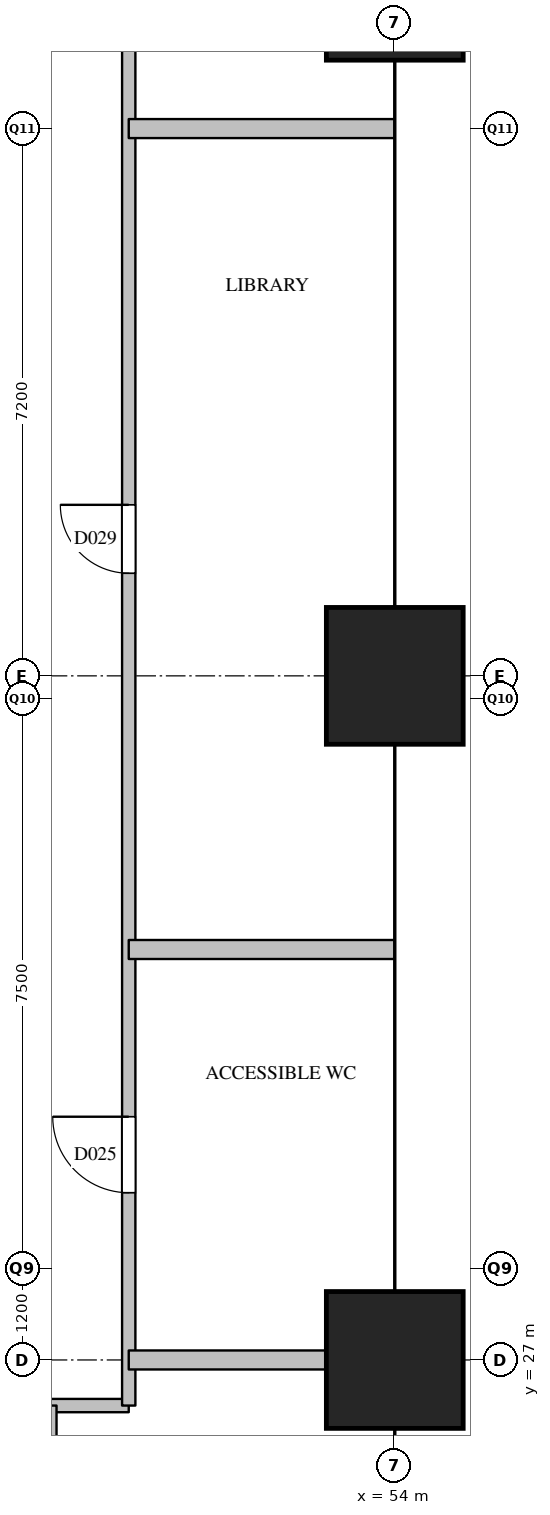
"""IFC4 building model, lengths in metres.
Left out: names, types, materials, properties, quantities, classifications, styles, units other than length and angle.
Written with IfcOpenShell. Run it as: python <this file> out.ifc"""

import sys

from ifc_helpers import new_model, si_unit, direction, frame, frame_2d, origin, origin_2d, place, context, subcontext, project, spatial, rectangle, extrude, element, fill, save


model = new_model("IFC4")
c1 = context("Model", 3, precision=1e-05, world=origin(), true_north=direction((0.0, 1.0)))
c2 = subcontext(c1, "Body", "Model", "MODEL_VIEW")
j1 = project(units=[si_unit("LENGTHUNIT", "METRE"), si_unit("PLANEANGLEUNIT", "RADIAN")], contexts=[c1])
p1 = place(None, origin())
s1 = spatial("IfcSite", under=j1, at=p1, CompositionType="ELEMENT")
p2 = place(p1, origin())
s2 = spatial("IfcBuilding", under=s1, at=p2, CompositionType="ELEMENT")
p3 = place(p2, frame((0.0, 0.0, 53.8)))
s3 = spatial("IfcBuildingStorey", under=s2, at=p3, CompositionType="ELEMENT", Elevation=53.8)
for number, where, z_axis, x_axis in (
    (1, (54.0, 27.0, 0.0), (0.0, 0.0, 1.0), (1.0, 0.0, 0.0)),
    (2, (54.0, 36.0, 0.0), (0.0, 0.0, 1.0), (1.0, 0.0, 0.0)),
    (3, (54.0, 45.0, 0.0), (0.0, 0.0, 1.0), (1.0, 0.0, 0.0)),
):
    element("IfcColumn", number, at=place(p3, frame(where, z_axis=z_axis, x_axis=x_axis)), inside=s3, PredefinedType="COLUMN", context=c2, shape_type="SweptSolid", body=[
        extrude(rectangle(XDim=1.8, YDim=1.8, at=origin_2d()), origin(), (0.0, 0.0, 1.0), 3.8),
    ])
p4 = place(p3, frame((47.32, 26.4, 0.0), z_axis=(0.0, 0.0, 1.0), x_axis=(1.0, 0.0, 0.0)))
e4 = element("IfcWall", 4, at=p4, inside=s3, PredefinedType="PARTITIONING", context=c2, shape_type="SweptSolid", body=[
    extrude(rectangle(XDim=3.18, YDim=0.175, at=frame_2d((1.59, 0.0))), origin(), (0.0, 0.0, 1.0), 3.5),
])
p5 = place(p3, frame((50.5, 26.4, 0.0), z_axis=(0.0, 0.0, 1.0), x_axis=(0.0, 1.0, 0.0)))
e5 = element("IfcWall", 5, at=p5, inside=s3, PredefinedType="PARTITIONING", context=c2, shape_type="SweptSolid", body=[
    extrude(rectangle(XDim=25.7, YDim=0.175, at=frame_2d((12.85, 0.0))), origin(), (0.0, 0.0, 1.0), 2.5),
])
p6 = place(p5, frame((2.8, 0.0, 0.0)))
e6 = element("IfcOpeningElement", 6, at=p6, cuts=e5, PredefinedType="OPENING", context=c2, shape_type="SweptSolid", body=[
    extrude(rectangle(XDim=1.0, YDim=2.1, at=frame_2d((0.5, 1.05))), frame((0.0, 0.097, 0.0), z_axis=(0.0, -1.0, 0.0), x_axis=(1.0, 0.0, 0.0)), (0.0, 0.0, 1.0), 0.195),
])
p7 = place(p5, frame((10.95, 0.0, 0.0)))
e7 = element("IfcOpeningElement", 7, at=p7, cuts=e5, PredefinedType="OPENING", context=c2, shape_type="SweptSolid", body=[
    extrude(rectangle(XDim=0.9, YDim=2.1, at=frame_2d((0.45, 1.05))), frame((0.0, 0.097, 0.0), z_axis=(0.0, -1.0, 0.0), x_axis=(1.0, 0.0, 0.0)), (0.0, 0.0, 1.0), 0.195),
])
p8 = place(p5, frame((20.8, 0.0, 0.0)))
e8 = element("IfcOpeningElement", 8, at=p8, cuts=e5, PredefinedType="OPENING", context=c2, shape_type="SweptSolid", body=[
    extrude(rectangle(XDim=0.9, YDim=2.1, at=frame_2d((0.45, 1.05))), frame((0.0, 0.097, 0.0), z_axis=(0.0, -1.0, 0.0), x_axis=(1.0, 0.0, 0.0)), (0.0, 0.0, 1.0), 0.195),
])
for number, where, z_axis, x_axis in (
    (9, (50.5, 27.0, 0.0), (0.0, 0.0, 1.0), (1.0, 0.0, 0.0)),
    (10, (50.5, 32.4, 0.0), (0.0, 0.0, 1.0), (1.0, 0.0, 0.0)),
    (11, (50.5, 43.2, 0.0), (0.0, 0.0, 1.0), (1.0, 0.0, 0.0)),
):
    element("IfcWall", number, at=place(p3, frame(where, z_axis=z_axis, x_axis=x_axis)), inside=s3, PredefinedType="PARTITIONING", context=c2, shape_type="SweptSolid", body=[
        extrude(rectangle(XDim=3.5, YDim=0.25, at=frame_2d((1.75, 0.0))), origin(), (0.0, 0.0, 1.0), 2.5),
    ])
p9 = place(p3, frame((49.5, 24.6, 0.0), z_axis=(0.0, 0.0, 1.0), x_axis=(0.0, 1.0, 0.0)))
e12 = element("IfcWall", 12, at=p9, inside=s3, PredefinedType="PARTITIONING", context=c2, shape_type="SweptSolid", body=[
    extrude(rectangle(XDim=1.8, YDim=0.1, at=frame_2d((0.9, 0.0))), origin(), (0.0, 0.0, 1.0), 3.5),
])
p10 = place(p9, frame((0.5, 0.0, 0.0)))
e13 = element("IfcOpeningElement", 13, at=p10, cuts=e12, PredefinedType="OPENING", context=c2, shape_type="SweptSolid", body=[
    extrude(rectangle(XDim=0.8, YDim=2.1, at=frame_2d((0.4, 1.05))), frame((0.0, 0.06, 0.0), z_axis=(0.0, -1.0, 0.0), x_axis=(1.0, 0.0, 0.0)), (0.0, 0.0, 1.0), 0.12),
])
p11 = place(p6, origin())
e14 = element("IfcDoor", 14, at=p11, inside=s3, OperationType="SINGLE_SWING_RIGHT", PredefinedType="DOOR", context=c2, shape_type="SweptSolid", body=[
    extrude(rectangle(XDim=1.0, YDim=2.1, at=frame_2d((0.5, 1.05))), frame((0.0, 0.025, 0.0), z_axis=(0.0, -1.0, 0.0), x_axis=(1.0, 0.0, 0.0)), (0.0, 0.0, 1.0), 0.05),
])
fill(e6, e14)
p12 = place(p7, origin())
e15 = element("IfcDoor", 15, at=p12, inside=s3, OperationType="SINGLE_SWING_RIGHT", PredefinedType="DOOR", context=c2, shape_type="SweptSolid", body=[
    extrude(rectangle(XDim=0.9, YDim=2.1, at=frame_2d((0.45, 1.05))), frame((0.0, 0.025, 0.0), z_axis=(0.0, -1.0, 0.0), x_axis=(1.0, 0.0, 0.0)), (0.0, 0.0, 1.0), 0.05),
])
fill(e7, e15)
save(model, sys.argv[1])
